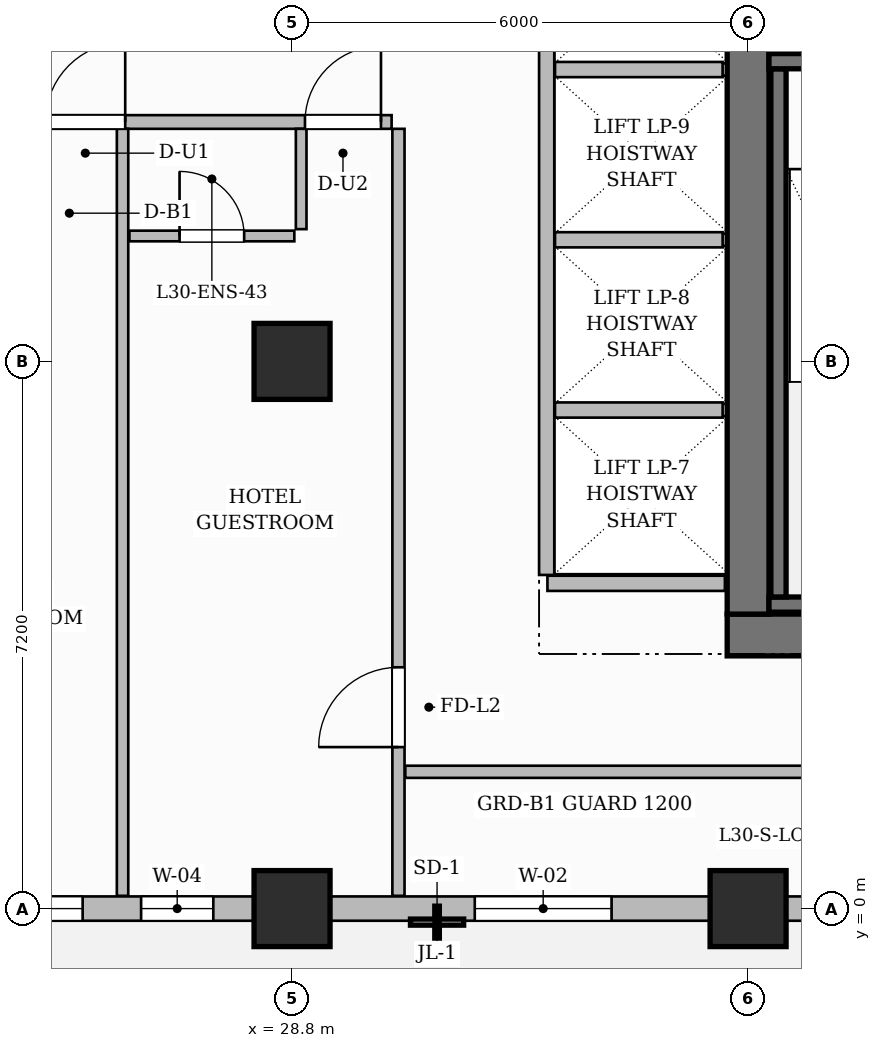
"""IFC4 building model, lengths in metres.
Left out: names, types, materials, properties, quantities, classifications, styles, units other than length and angle.
Written with IfcOpenShell. Run it as: python <this file> out.ifc"""

import sys

from ifc_helpers import new_model, si_unit, direction, frame, frame_2d, origin, origin_2d, place, context, subcontext, project, spatial, rectangle, extrude, source, transform, mapped, element, fill, save


model = new_model("IFC4")
c1 = context("Model", 3, precision=1e-05, world=origin(), true_north=direction((0.0, 1.0)))
c2 = subcontext(c1, "Body", "Model", "MODEL_VIEW")
j1 = project(units=[si_unit("LENGTHUNIT", "METRE"), si_unit("PLANEANGLEUNIT", "RADIAN")], contexts=[c1])
p1 = place(None, origin())
s1 = spatial("IfcSite", under=j1, at=p1, CompositionType="ELEMENT")
p2 = place(p1, origin())
s2 = spatial("IfcBuilding", under=s1, at=p2, CompositionType="ELEMENT")
p3 = place(p2, frame((0.0, 0.0, 122.9)))
s3 = spatial("IfcBuildingStorey", under=s2, at=p3, CompositionType="ELEMENT", Elevation=122.9)
p4 = place(p3, frame((34.525, 3.6, 0.0), z_axis=(0.0, 0.0, 1.0), x_axis=(1.0, 0.0, 0.0)))
e1 = element("IfcWall", 1, at=p4, inside=s3, PredefinedType="SHEAR", context=c2, shape_type="SweptSolid", body=[
    extrude(rectangle(XDim=15.55, YDim=0.55, at=frame_2d((7.775, 0.0))), origin(), (0.0, 0.0, 1.0), 3.7),
])
p5 = place(p4, frame((4.475, 0.0, 0.0)))
e2 = element("IfcOpeningElement", 2, at=p5, cuts=e1, PredefinedType="OPENING", context=c2, shape_type="SweptSolid", body=[
    extrude(rectangle(XDim=0.9, YDim=2.1, at=frame_2d((0.45, 1.05))), frame((0.0, 0.285, 0.0), z_axis=(0.0, -1.0, 0.0), x_axis=(1.0, 0.0, 0.0)), (0.0, 0.0, 1.0), 0.57),
])
p6 = place(p4, frame((6.925, 0.0, 0.0)))
e3 = element("IfcOpeningElement", 3, at=p6, cuts=e1, PredefinedType="OPENING", context=c2, shape_type="SweptSolid", body=[
    extrude(rectangle(XDim=0.9, YDim=2.1, at=frame_2d((0.45, 1.05))), frame((0.0, 0.285, 0.0), z_axis=(0.0, -1.0, 0.0), x_axis=(1.0, 0.0, 0.0)), (0.0, 0.0, 1.0), 0.57),
])
p7 = place(p3, frame((34.8, 3.875, 0.0), z_axis=(0.0, 0.0, 1.0), x_axis=(0.0, 1.0, 0.0)))
e4 = element("IfcWall", 4, at=p7, inside=s3, PredefinedType="SHEAR", context=c2, shape_type="SweptSolid", body=[
    extrude(rectangle(XDim=10.25, YDim=0.55, at=frame_2d((5.125, 0.0))), origin(), (0.0, 0.0, 1.0), 3.7),
])
m1 = source(origin(), c2, "Body", "SweptSolid", [
    extrude(rectangle(XDim=1.0, YDim=1.0, at=origin_2d()), origin(), (0.0, 0.0, 1.0), 3.7),
])
for number, where, z_axis, x_axis in (
    (5, (28.8, 0.0, 0.0), (0.0, 0.0, 1.0), (1.0, 0.0, 0.0)),
    (6, (28.8, 7.2, 0.0), (0.0, 0.0, 1.0), (1.0, 0.0, 0.0)),
    (7, (34.8, 0.0, 0.0), (0.0, 0.0, 1.0), (1.0, 0.0, 0.0)),
):
    element("IfcColumn", number, at=place(p3, frame(where, z_axis=z_axis, x_axis=x_axis)), inside=s3, PredefinedType="COLUMN", context=c2, shape_type="MappedRepresentation", body=[
        mapped(m1, transform((0.0, 0.0, 0.0), scale=1.0)),
    ])
p8 = place(p3, frame((35.075, 4.0, 0.0), z_axis=(0.0, 0.0, 1.0), x_axis=(1.0, 0.0, 0.0)))
e8 = element("IfcWall", 8, at=p8, inside=s3, PredefinedType="SHEAR", context=c2, shape_type="SweptSolid", body=[
    extrude(rectangle(XDim=3.165, YDim=0.2, at=frame_2d((1.583, 0.0))), origin(), (0.0, 0.0, 1.0), 3.7),
])
p9 = place(p3, frame((35.2, 4.1, 0.0), z_axis=(0.0, 0.0, 1.0), x_axis=(0.0, 1.0, 0.0)))
e9 = element("IfcWall", 9, at=p9, inside=s3, PredefinedType="SHEAR", context=c2, shape_type="SweptSolid", body=[
    extrude(rectangle(XDim=6.95, YDim=0.2, at=frame_2d((3.475, 0.0))), origin(), (0.0, 0.0, 1.0), 3.7),
])
p10 = place(p3, frame((35.075, 11.15, 0.0), z_axis=(0.0, 0.0, 1.0), x_axis=(1.0, 0.0, 0.0)))
e10 = element("IfcWall", 10, at=p10, inside=s3, PredefinedType="SHEAR", context=c2, shape_type="SweptSolid", body=[
    extrude(rectangle(XDim=3.165, YDim=0.2, at=frame_2d((1.583, 0.0))), origin(), (0.0, 0.0, 1.0), 3.7),
])
p11 = place(p10, frame((1.07, 0.0, 0.0)))
e11 = element("IfcOpeningElement", 11, at=p11, cuts=e10, PredefinedType="OPENING", context=c2, shape_type="SweptSolid", body=[
    extrude(rectangle(XDim=1.05, YDim=2.2, at=frame_2d((0.525, 1.1))), frame((0.0, 0.11, 0.0), z_axis=(0.0, -1.0, 0.0), x_axis=(1.0, 0.0, 0.0)), (0.0, 0.0, 1.0), 0.22),
])
p12 = place(p3, frame((32.16, 4.28, 0.0), z_axis=(0.0, 0.0, 1.0), x_axis=(1.0, 0.0, 0.0)))
e12 = element("IfcWall", 12, at=p12, inside=s3, PredefinedType="PARTITIONING", context=c2, shape_type="SweptSolid", body=[
    extrude(rectangle(XDim=2.335, YDim=0.2, at=frame_2d((1.167, 0.0))), origin(), (0.0, 0.0, 1.0), 3.45),
])
p13 = place(p3, frame((32.15, 4.39, 0.0), z_axis=(0.0, 0.0, 1.0), x_axis=(0.0, 1.0, 0.0)))
e13 = element("IfcWall", 13, at=p13, inside=s3, PredefinedType="PARTITIONING", context=c2, shape_type="SweptSolid", body=[
    extrude(rectangle(XDim=8.82, YDim=0.2, at=frame_2d((4.41, 0.0))), origin(), (0.0, 0.0, 1.0), 3.45),
])
for number, where, z_axis, x_axis in (
    (14, (32.26, 6.56, 0.0), (0.0, 0.0, 1.0), (1.0, 0.0, 0.0)),
    (15, (32.26, 8.8, 0.0), (0.0, 0.0, 1.0), (1.0, 0.0, 0.0)),
    (16, (32.26, 11.04, 0.0), (0.0, 0.0, 1.0), (1.0, 0.0, 0.0)),
):
    element("IfcWall", number, at=place(p3, frame(where, z_axis=z_axis, x_axis=x_axis)), inside=s3, PredefinedType="PARTITIONING", context=c2, shape_type="SweptSolid", body=[
        extrude(rectangle(XDim=2.205, YDim=0.2, at=frame_2d((1.103, 0.0))), origin(), (0.0, 0.0, 1.0), 3.45),
    ])
p14 = place(p3, frame((14.568, 10.35, 0.0), z_axis=(0.0, 0.0, 1.0), x_axis=(1.0, 0.0, 0.0)))
e17 = element("IfcWall", 17, at=p14, inside=s3, PredefinedType="PARTITIONING", context=c2, shape_type="SweptSolid", body=[
    extrude(rectangle(XDim=15.542, YDim=0.18, at=frame_2d((7.771, 0.0))), origin(), (0.0, 0.0, 1.0), 3.45),
])
p15 = place(p14, frame((2.157, 0.0, 0.0)))
e18 = element("IfcOpeningElement", 18, at=p15, cuts=e17, PredefinedType="OPENING", context=c2, shape_type="SweptSolid", body=[
    extrude(rectangle(XDim=1.05, YDim=2.25, at=frame_2d((0.525, 1.125))), frame((0.0, 0.1, 0.0), z_axis=(0.0, -1.0, 0.0), x_axis=(1.0, 0.0, 0.0)), (0.0, 0.0, 1.0), 0.2),
])
p16 = place(p14, frame((7.142, 0.0, 0.0)))
e19 = element("IfcOpeningElement", 19, at=p16, cuts=e17, PredefinedType="OPENING", context=c2, shape_type="SweptSolid", body=[
    extrude(rectangle(XDim=1.0, YDim=2.2, at=frame_2d((0.5, 1.1))), frame((0.0, 0.1, 0.0), z_axis=(0.0, -1.0, 0.0), x_axis=(1.0, 0.0, 0.0)), (0.0, 0.0, 1.0), 0.2),
])
p17 = place(p14, frame((10.987, 0.0, 0.0)))
e20 = element("IfcOpeningElement", 20, at=p17, cuts=e17, PredefinedType="OPENING", context=c2, shape_type="SweptSolid", body=[
    extrude(rectangle(XDim=1.05, YDim=2.25, at=frame_2d((0.525, 1.125))), frame((0.0, 0.1, 0.0), z_axis=(0.0, -1.0, 0.0), x_axis=(1.0, 0.0, 0.0)), (0.0, 0.0, 1.0), 0.2),
])
p18 = place(p14, frame((14.402, 0.0, 0.0)))
e21 = element("IfcOpeningElement", 21, at=p18, cuts=e17, PredefinedType="OPENING", context=c2, shape_type="SweptSolid", body=[
    extrude(rectangle(XDim=1.0, YDim=2.2, at=frame_2d((0.5, 1.1))), frame((0.0, 0.1, 0.0), z_axis=(0.0, -1.0, 0.0), x_axis=(1.0, 0.0, 0.0)), (0.0, 0.0, 1.0), 0.2),
])
p19 = place(p3, frame((30.2, 0.168, 0.0), z_axis=(0.0, 0.0, 1.0), x_axis=(0.0, 1.0, 0.0)))
e22 = element("IfcWall", 22, at=p19, inside=s3, PredefinedType="PARTITIONING", context=c2, shape_type="SweptSolid", body=[
    extrude(rectangle(XDim=10.092, YDim=0.16, at=frame_2d((5.046, 0.0))), origin(), (0.0, 0.0, 1.0), 3.45),
])
p20 = place(p19, frame((1.957, 0.0, 0.0)))
e23 = element("IfcOpeningElement", 23, at=p20, cuts=e22, PredefinedType="OPENING", context=c2, shape_type="SweptSolid", body=[
    extrude(rectangle(XDim=1.05, YDim=2.15, at=frame_2d((0.525, 1.075))), frame((0.0, 0.09, 0.0), z_axis=(0.0, -1.0, 0.0), x_axis=(1.0, 0.0, 0.0)), (0.0, 0.0, 1.0), 0.18),
])
p21 = place(p3, frame((30.29, 1.8, 0.0), z_axis=(0.0, 0.0, 1.0), x_axis=(1.0, 0.0, 0.0)))
e24 = element("IfcWall", 24, at=p21, inside=s3, PredefinedType="PARTITIONING", context=c2, shape_type="SweptSolid", body=[
    extrude(rectangle(XDim=19.37, YDim=0.16, at=frame_2d((9.685, 0.0))), origin(), (0.0, 0.0, 1.0), 3.45),
])
p22 = place(p21, frame((9.735, 0.0, 0.0)))
e25 = element("IfcOpeningElement", 25, at=p22, cuts=e24, PredefinedType="OPENING", context=c2, shape_type="SweptSolid", body=[
    extrude(rectangle(XDim=0.95, YDim=2.15, at=frame_2d((0.475, 1.075))), frame((0.0, 0.09, 0.0), z_axis=(0.0, -1.0, 0.0), x_axis=(1.0, 0.0, 0.0)), (0.0, 0.0, 1.0), 0.18),
])
p23 = place(p3, frame((26.57, 0.168, 0.0), z_axis=(0.0, 0.0, 1.0), x_axis=(0.0, 1.0, 0.0)))
e26 = element("IfcWall", 26, at=p23, inside=s3, PredefinedType="PARTITIONING", context=c2, shape_type="SweptSolid", body=[
    extrude(rectangle(XDim=10.092, YDim=0.15, at=frame_2d((5.046, 0.0))), origin(), (0.0, 0.0, 1.0), 3.45),
])
p24 = place(p3, frame((28.92, 8.94, 0.0), z_axis=(0.0, 0.0, 1.0), x_axis=(0.0, 1.0, 0.0)))
e27 = element("IfcWall", 27, at=p24, inside=s3, PredefinedType="PARTITIONING", context=c2, shape_type="SweptSolid", body=[
    extrude(rectangle(XDim=1.32, YDim=0.14, at=frame_2d((0.66, 0.0))), origin(), (0.0, 0.0, 1.0), 2.935),
])
p25 = place(p3, frame((26.66, 8.85, 0.0), z_axis=(0.0, 0.0, 1.0), x_axis=(1.0, 0.0, 0.0)))
e28 = element("IfcWall", 28, at=p25, inside=s3, PredefinedType="PARTITIONING", context=c2, shape_type="SweptSolid", body=[
    extrude(rectangle(XDim=2.17, YDim=0.14, at=frame_2d((1.085, 0.0))), origin(), (0.0, 0.0, 1.0), 3.45),
])
p26 = place(p25, frame((0.66, 0.0, 0.0)))
e29 = element("IfcOpeningElement", 29, at=p26, cuts=e28, PredefinedType="OPENING", context=c2, shape_type="SweptSolid", body=[
    extrude(rectangle(XDim=0.85, YDim=2.1, at=frame_2d((0.425, 1.05))), frame((0.0, 0.08, 0.0), z_axis=(0.0, -1.0, 0.0), x_axis=(1.0, 0.0, 0.0)), (0.0, 0.0, 1.0), 0.16),
])
p27 = place(p3, frame((14.4, 0.0, 0.0), z_axis=(0.0, 0.0, 1.0), x_axis=(1.0, 0.0, 0.0)))
e30 = element("IfcWall", 30, at=p27, inside=s3, PredefinedType="SOLIDWALL", context=c2, shape_type="SweptSolid", body=[
    extrude(rectangle(XDim=35.4, YDim=0.32, at=frame_2d((17.7, 0.0))), origin(), (0.0, 0.0, 1.0), 2.935),
])
p28 = place(p27, frame((0.85, 0.0, 0.0)))
e31 = element("IfcOpeningElement", 31, at=p28, cuts=e30, PredefinedType="OPENING", context=c2, shape_type="SweptSolid", body=[
    extrude(rectangle(XDim=1.2, YDim=2.2, at=frame_2d((0.6, 1.1))), frame((0.0, 0.17, 0.0), z_axis=(0.0, -1.0, 0.0), x_axis=(1.0, 0.0, 0.0)), (0.0, 0.0, 1.0), 0.34),
])
p29 = place(p27, frame((2.671, 0.0, 0.8)))
e32 = element("IfcOpeningElement", 32, at=p29, cuts=e30, PredefinedType="OPENING", context=c2, shape_type="SweptSolid", body=[
    extrude(rectangle(XDim=0.95, YDim=1.75, at=frame_2d((0.475, 0.875))), frame((0.0, 0.17, 0.0), z_axis=(0.0, -1.0, 0.0), x_axis=(1.0, 0.0, 0.0)), (0.0, 0.0, 1.0), 0.34),
])
p30 = place(p27, frame((4.479, 0.0, 0.8)))
e33 = element("IfcOpeningElement", 33, at=p30, cuts=e30, PredefinedType="OPENING", context=c2, shape_type="SweptSolid", body=[
    extrude(rectangle(XDim=1.4, YDim=1.85, at=frame_2d((0.7, 0.925))), frame((0.0, 0.17, 0.0), z_axis=(0.0, -1.0, 0.0), x_axis=(1.0, 0.0, 0.0)), (0.0, 0.0, 1.0), 0.34),
])
p31 = place(p27, frame((8.181, 0.0, 0.8)))
e34 = element("IfcOpeningElement", 34, at=p31, cuts=e30, PredefinedType="OPENING", context=c2, shape_type="SweptSolid", body=[
    extrude(rectangle(XDim=0.95, YDim=1.75, at=frame_2d((0.475, 0.875))), frame((0.0, 0.17, 0.0), z_axis=(0.0, -1.0, 0.0), x_axis=(1.0, 0.0, 0.0)), (0.0, 0.0, 1.0), 0.34),
])
p32 = place(p27, frame((9.845, 0.0, 0.8)))
e35 = element("IfcOpeningElement", 35, at=p32, cuts=e30, PredefinedType="OPENING", context=c2, shape_type="SweptSolid", body=[
    extrude(rectangle(XDim=1.8, YDim=1.85, at=frame_2d((0.9, 0.925))), frame((0.0, 0.17, 0.0), z_axis=(0.0, -1.0, 0.0), x_axis=(1.0, 0.0, 0.0)), (0.0, 0.0, 1.0), 0.34),
])
p33 = place(p27, frame((12.414, 0.0, 0.8)))
e36 = element("IfcOpeningElement", 36, at=p33, cuts=e30, PredefinedType="OPENING", context=c2, shape_type="SweptSolid", body=[
    extrude(rectangle(XDim=0.95, YDim=1.75, at=frame_2d((0.475, 0.875))), frame((0.0, 0.17, 0.0), z_axis=(0.0, -1.0, 0.0), x_axis=(1.0, 0.0, 0.0)), (0.0, 0.0, 1.0), 0.34),
])
p34 = place(p27, frame((16.804, 0.0, 0.8)))
e37 = element("IfcOpeningElement", 37, at=p34, cuts=e30, PredefinedType="OPENING", context=c2, shape_type="SweptSolid", body=[
    extrude(rectangle(XDim=1.8, YDim=1.85, at=frame_2d((0.9, 0.925))), frame((0.0, 0.17, 0.0), z_axis=(0.0, -1.0, 0.0), x_axis=(1.0, 0.0, 0.0)), (0.0, 0.0, 1.0), 0.34),
])
p35 = place(p27, frame((21.725, 0.0, 0.8)))
e38 = element("IfcOpeningElement", 38, at=p35, cuts=e30, PredefinedType="OPENING", context=c2, shape_type="SweptSolid", body=[
    extrude(rectangle(XDim=1.8, YDim=1.85, at=frame_2d((0.9, 0.925))), frame((0.0, 0.17, 0.0), z_axis=(0.0, -1.0, 0.0), x_axis=(1.0, 0.0, 0.0)), (0.0, 0.0, 1.0), 0.34),
])
p36 = place(p27, frame((24.475, 0.0, 0.8)))
e39 = element("IfcOpeningElement", 39, at=p36, cuts=e30, PredefinedType="OPENING", context=c2, shape_type="SweptSolid", body=[
    extrude(rectangle(XDim=1.8, YDim=1.85, at=frame_2d((0.9, 0.925))), frame((0.0, 0.17, 0.0), z_axis=(0.0, -1.0, 0.0), x_axis=(1.0, 0.0, 0.0)), (0.0, 0.0, 1.0), 0.34),
])
p37 = place(p27, frame((29.075, 0.0, 0.8)))
e40 = element("IfcOpeningElement", 40, at=p37, cuts=e30, PredefinedType="OPENING", context=c2, shape_type="SweptSolid", body=[
    extrude(rectangle(XDim=1.8, YDim=1.85, at=frame_2d((0.9, 0.925))), frame((0.0, 0.17, 0.0), z_axis=(0.0, -1.0, 0.0), x_axis=(1.0, 0.0, 0.0)), (0.0, 0.0, 1.0), 0.34),
])
p38 = place(p27, frame((32.125, 0.0, 0.8)))
e41 = element("IfcOpeningElement", 41, at=p38, cuts=e30, PredefinedType="OPENING", context=c2, shape_type="SweptSolid", body=[
    extrude(rectangle(XDim=1.8, YDim=1.85, at=frame_2d((0.9, 0.925))), frame((0.0, 0.17, 0.0), z_axis=(0.0, -1.0, 0.0), x_axis=(1.0, 0.0, 0.0)), (0.0, 0.0, 1.0), 0.34),
])
m2 = source(origin(), c2, "Body", "SweptSolid", [
    extrude(rectangle(XDim=1.05, YDim=2.15, at=frame_2d((0.525, 1.075))), frame((0.0, 0.025, 0.0), z_axis=(0.0, -1.0, 0.0), x_axis=(1.0, 0.0, 0.0)), (0.0, 0.0, 1.0), 0.05),
])
p39 = place(p20, origin())
e42 = element("IfcDoor", 42, at=p39, inside=s3, OperationType="SINGLE_SWING_LEFT", PredefinedType="DOOR", context=c2, shape_type="MappedRepresentation", body=[
    mapped(m2, transform((0.0, 0.0, 0.0), scale=1.0)),
])
fill(e23, e42)
m3 = source(origin(), c2, "Body", "SweptSolid", [
    extrude(rectangle(XDim=1.05, YDim=2.25, at=frame_2d((0.525, 1.125))), frame((0.0, 0.025, 0.0), z_axis=(0.0, -1.0, 0.0), x_axis=(1.0, 0.0, 0.0)), (0.0, 0.0, 1.0), 0.05),
])
p40 = place(p17, origin())
e43 = element("IfcDoor", 43, at=p40, inside=s3, OperationType="SINGLE_SWING_RIGHT", PredefinedType="DOOR", context=c2, shape_type="MappedRepresentation", body=[
    mapped(m3, transform((0.0, 0.0, 0.0), scale=1.0)),
])
fill(e20, e43)
m4 = source(origin(), c2, "Body", "SweptSolid", [
    extrude(rectangle(XDim=0.85, YDim=2.1, at=frame_2d((0.425, 1.05))), frame((0.0, 0.025, 0.0), z_axis=(0.0, -1.0, 0.0), x_axis=(1.0, 0.0, 0.0)), (0.0, 0.0, 1.0), 0.05),
])
p41 = place(p26, origin())
e44 = element("IfcDoor", 44, at=p41, inside=s3, OperationType="SINGLE_SWING_LEFT", PredefinedType="DOOR", context=c2, shape_type="MappedRepresentation", body=[
    mapped(m4, transform((0.0, 0.0, 0.0), scale=1.0)),
])
fill(e29, e44)
m5 = source(origin(), c2, "Body", "SweptSolid", [
    extrude(rectangle(XDim=1.0, YDim=2.2, at=frame_2d((0.5, 1.1))), frame((0.0, 0.025, 0.0), z_axis=(0.0, -1.0, 0.0), x_axis=(1.0, 0.0, 0.0)), (0.0, 0.0, 1.0), 0.05),
])
p42 = place(p18, origin())
e45 = element("IfcDoor", 45, at=p42, inside=s3, OperationType="SINGLE_SWING_RIGHT", PredefinedType="DOOR", context=c2, shape_type="MappedRepresentation", body=[
    mapped(m5, transform((0.0, 0.0, 0.0), scale=1.0)),
])
fill(e21, e45)
m6 = source(origin(), c2, "Body", "SweptSolid", [
    extrude(rectangle(XDim=1.8, YDim=1.85, at=frame_2d((0.9, 0.925))), frame((0.0, 0.03, 0.0), z_axis=(0.0, -1.0, 0.0), x_axis=(1.0, 0.0, 0.0)), (0.0, 0.0, 1.0), 0.06),
])
p43 = place(p32, origin())
e46 = element("IfcWindow", 46, at=p43, inside=s3, PartitioningType="DOUBLE_PANEL_VERTICAL", PredefinedType="WINDOW", context=c2, shape_type="MappedRepresentation", body=[
    mapped(m6, transform((0.0, 0.0, 0.0), scale=1.0)),
])
fill(e35, e46)
m7 = source(origin(), c2, "Body", "SweptSolid", [
    extrude(rectangle(XDim=0.95, YDim=1.75, at=frame_2d((0.475, 0.875))), frame((0.0, 0.03, 0.0), z_axis=(0.0, -1.0, 0.0), x_axis=(1.0, 0.0, 0.0)), (0.0, 0.0, 1.0), 0.06),
])
p44 = place(p33, origin())
e47 = element("IfcWindow", 47, at=p44, inside=s3, PartitioningType="SINGLE_PANEL", PredefinedType="WINDOW", context=c2, shape_type="MappedRepresentation", body=[
    mapped(m7, transform((0.0, 0.0, 0.0), scale=1.0)),
])
fill(e36, e47)
p45 = place(p34, origin())
e48 = element("IfcWindow", 48, at=p45, inside=s3, PartitioningType="DOUBLE_PANEL_VERTICAL", PredefinedType="WINDOW", context=c2, shape_type="MappedRepresentation", body=[
    mapped(m6, transform((0.0, 0.0, 0.0), scale=1.0)),
])
fill(e37, e48)
save(model, sys.argv[1])
